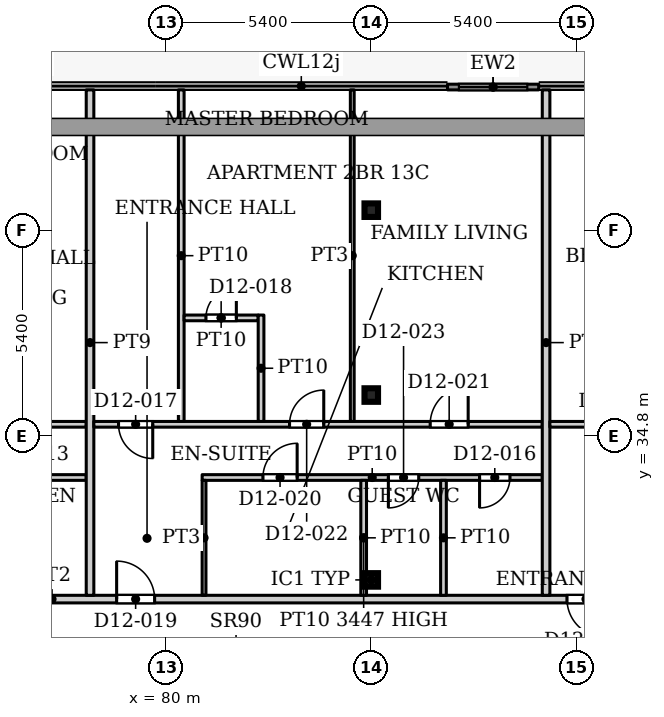
"""IFC4 building model, lengths in metres.
Left out: names, types, materials, properties, quantities, classifications, styles, units other than length and angle.
Written with IfcOpenShell. Run it as: python <this file> out.ifc"""

import sys

from ifc_helpers import new_model, si_unit, direction, frame, frame_2d, origin, origin_2d, place, context, subcontext, project, spatial, rectangle, hollow_rectangle, extrude, source, transform, mapped, element, fill, save


model = new_model("IFC4")
c1 = context("Model", 3, precision=1e-05, world=origin(), true_north=direction((0.0, 1.0)))
c2 = subcontext(c1, "Body", "Model", "MODEL_VIEW")
j1 = project(units=[si_unit("LENGTHUNIT", "METRE"), si_unit("PLANEANGLEUNIT", "RADIAN")], contexts=[c1])
p1 = place(None, origin())
s1 = spatial("IfcSite", under=j1, at=p1, CompositionType="ELEMENT")
p2 = place(p1, origin())
s2 = spatial("IfcBuilding", under=s1, at=p2, CompositionType="ELEMENT")
p3 = place(p2, frame((0.0, 0.0, 57.8)))
s3 = spatial("IfcBuildingStorey", under=s2, at=p3, CompositionType="ELEMENT", Elevation=57.8)
for number, where, z_axis, x_axis in (
    (1, (85.4, 31.005, 0.0), (0.0, 0.0, 1.0), (1.0, 0.0, 0.0)),
    (2, (85.4, 35.87, 0.0), (0.0, 0.0, 1.0), (1.0, 0.0, 0.0)),
    (3, (85.4, 40.735, 0.0), (0.0, 0.0, 1.0), (1.0, 0.0, 0.0)),
):
    element("IfcColumn", number, at=place(p3, frame(where, z_axis=z_axis, x_axis=x_axis)), inside=s3, PredefinedType="COLUMN", context=c2, shape_type="SweptSolid", body=[
        extrude(hollow_rectangle(XDim=0.356, YDim=0.356, WallThickness=0.016, InnerFilletRadius=0.016, OuterFilletRadius=0.032, at=origin_2d()), origin(), (0.0, 0.0, 1.0), 3.9),
    ])
p4 = place(p3, frame((87.406, 43.975, 0.0), z_axis=(0.0, 0.0, 1.0), x_axis=(1.0, 0.0, 0.0)))
e4 = element("IfcWall", 4, at=p4, inside=s3, PredefinedType="SOLIDWALL", context=c2, shape_type="SweptSolid", body=[
    extrude(rectangle(XDim=2.4, YDim=0.15, at=frame_2d((1.2, 0.0))), origin(), (0.0, 0.0, 1.0), 3.75),
])
p5 = place(p4, frame((0.3, 0.0, 0.0)))
e5 = element("IfcOpeningElement", 5, at=p5, cuts=e4, PredefinedType="OPENING", context=c2, shape_type="SweptSolid", body=[
    extrude(rectangle(XDim=1.8, YDim=2.4, at=frame_2d((0.9, 1.2))), frame((0.0, 0.085, 0.0), z_axis=(0.0, -1.0, 0.0), x_axis=(1.0, 0.0, 0.0)), (0.0, 0.0, 1.0), 0.17),
])
p6 = place(p3, frame((55.9, 30.5, 0.0), z_axis=(0.0, 0.0, 1.0), x_axis=(1.0, 0.0, 0.0)))
e6 = element("IfcWall", 6, at=p6, inside=s3, PredefinedType="PARTITIONING", context=c2, shape_type="SweptSolid", body=[
    extrude(rectangle(XDim=42.2, YDim=0.2, at=frame_2d((21.1, 0.0))), origin(), (0.0, 0.0, 1.0), 3.6),
])
p7 = place(p6, frame((0.6, 0.0, 0.0)))
e7 = element("IfcOpeningElement", 7, at=p7, cuts=e6, PredefinedType="OPENING", context=c2, shape_type="SweptSolid", body=[
    extrude(rectangle(XDim=1.0, YDim=2.1, at=frame_2d((0.5, 1.05))), frame((0.0, 0.11, 0.0), z_axis=(0.0, -1.0, 0.0), x_axis=(1.0, 0.0, 0.0)), (0.0, 0.0, 1.0), 0.22),
])
p8 = place(p6, frame((13.2, 0.0, 0.0)))
e8 = element("IfcOpeningElement", 8, at=p8, cuts=e6, PredefinedType="OPENING", context=c2, shape_type="SweptSolid", body=[
    extrude(rectangle(XDim=1.0, YDim=2.1, at=frame_2d((0.5, 1.05))), frame((0.0, 0.11, 0.0), z_axis=(0.0, -1.0, 0.0), x_axis=(1.0, 0.0, 0.0)), (0.0, 0.0, 1.0), 0.22),
])
p9 = place(p6, frame((22.8, 0.0, 0.0)))
e9 = element("IfcOpeningElement", 9, at=p9, cuts=e6, PredefinedType="OPENING", context=c2, shape_type="SweptSolid", body=[
    extrude(rectangle(XDim=1.0, YDim=2.1, at=frame_2d((0.5, 1.05))), frame((0.0, 0.11, 0.0), z_axis=(0.0, -1.0, 0.0), x_axis=(1.0, 0.0, 0.0)), (0.0, 0.0, 1.0), 0.22),
])
p10 = place(p6, frame((34.65, 0.0, 0.0)))
e10 = element("IfcOpeningElement", 10, at=p10, cuts=e6, PredefinedType="OPENING", context=c2, shape_type="SweptSolid", body=[
    extrude(rectangle(XDim=1.0, YDim=2.1, at=frame_2d((0.5, 1.05))), frame((0.0, 0.11, 0.0), z_axis=(0.0, -1.0, 0.0), x_axis=(1.0, 0.0, 0.0)), (0.0, 0.0, 1.0), 0.22),
])
p11 = place(p3, frame((68.8, 35.1, 0.0), z_axis=(0.0, 0.0, 1.0), x_axis=(1.0, 0.0, 0.0)))
e11 = element("IfcWall", 11, at=p11, inside=s3, PredefinedType="PARTITIONING", context=c2, shape_type="SweptSolid", body=[
    extrude(rectangle(XDim=9.1, YDim=0.15, at=frame_2d((4.55, 0.0))), origin(), (0.0, 0.0, 1.0), 3.6),
])
p12 = place(p11, frame((1.4, 0.0, 0.0)))
e12 = element("IfcOpeningElement", 12, at=p12, cuts=e11, PredefinedType="OPENING", context=c2, shape_type="SweptSolid", body=[
    extrude(rectangle(XDim=0.9, YDim=2.1, at=frame_2d((0.45, 1.05))), frame((0.0, 0.085, 0.0), z_axis=(0.0, -1.0, 0.0), x_axis=(1.0, 0.0, 0.0)), (0.0, 0.0, 1.0), 0.17),
])
p13 = place(p11, frame((6.0, 0.0, 0.0)))
e13 = element("IfcOpeningElement", 13, at=p13, cuts=e11, PredefinedType="OPENING", context=c2, shape_type="SweptSolid", body=[
    extrude(rectangle(XDim=1.0, YDim=2.1, at=frame_2d((0.5, 1.05))), frame((0.0, 0.085, 0.0), z_axis=(0.0, -1.0, 0.0), x_axis=(1.0, 0.0, 0.0)), (0.0, 0.0, 1.0), 0.17),
])
p14 = place(p3, frame((70.425, 33.7, 0.0), z_axis=(0.0, 0.0, 1.0), x_axis=(1.0, 0.0, 0.0)))
e14 = element("IfcWall", 14, at=p14, inside=s3, PredefinedType="PARTITIONING", context=c2, shape_type="SweptSolid", body=[
    extrude(rectangle(XDim=7.475, YDim=0.15, at=frame_2d((3.737, 0.0))), origin(), (0.0, 0.0, 1.0), 3.6),
])
p15 = place(p14, frame((0.875, 0.0, 0.0)))
e15 = element("IfcOpeningElement", 15, at=p15, cuts=e14, PredefinedType="OPENING", context=c2, shape_type="SweptSolid", body=[
    extrude(rectangle(XDim=0.8, YDim=2.1, at=frame_2d((0.4, 1.05))), frame((0.0, 0.085, 0.0), z_axis=(0.0, -1.0, 0.0), x_axis=(1.0, 0.0, 0.0)), (0.0, 0.0, 1.0), 0.17),
])
p16 = place(p14, frame((5.475, 0.0, 0.0)))
e16 = element("IfcOpeningElement", 16, at=p16, cuts=e14, PredefinedType="OPENING", context=c2, shape_type="SweptSolid", body=[
    extrude(rectangle(XDim=0.9, YDim=2.1, at=frame_2d((0.45, 1.05))), frame((0.0, 0.085, 0.0), z_axis=(0.0, -1.0, 0.0), x_axis=(1.0, 0.0, 0.0)), (0.0, 0.0, 1.0), 0.17),
])
p17 = place(p14, frame((2.975, 0.0, 0.0)))
e17 = element("IfcOpeningElement", 17, at=p17, cuts=e14, PredefinedType="OPENING", context=c2, shape_type="SweptSolid", body=[
    extrude(rectangle(XDim=0.8, YDim=2.1, at=frame_2d((0.4, 1.05))), frame((0.0, 0.085, 0.0), z_axis=(0.0, -1.0, 0.0), x_axis=(1.0, 0.0, 0.0)), (0.0, 0.0, 1.0), 0.17),
])
p18 = place(p3, frame((78.0, 30.6, 0.0), z_axis=(0.0, 0.0, 1.0), x_axis=(0.0, 1.0, 0.0)))
e18 = element("IfcWall", 18, at=p18, inside=s3, PredefinedType="PARTITIONING", context=c2, shape_type="SweptSolid", body=[
    extrude(rectangle(XDim=13.3, YDim=0.2, at=frame_2d((6.65, 0.0))), origin(), (0.0, 0.0, 1.0), 3.6),
])
p19 = place(p3, frame((78.1, 35.1, 0.0), z_axis=(0.0, 0.0, 1.0), x_axis=(1.0, 0.0, 0.0)))
e19 = element("IfcWall", 19, at=p19, inside=s3, PredefinedType="PARTITIONING", context=c2, shape_type="SweptSolid", body=[
    extrude(rectangle(XDim=11.8, YDim=0.15, at=frame_2d((5.9, 0.0))), origin(), (0.0, 0.0, 1.0), 3.6),
])
p20 = place(p19, frame((0.65, 0.0, 0.0)))
e20 = element("IfcOpeningElement", 20, at=p20, cuts=e19, PredefinedType="OPENING", context=c2, shape_type="SweptSolid", body=[
    extrude(rectangle(XDim=0.9, YDim=2.1, at=frame_2d((0.45, 1.05))), frame((0.0, 0.085, 0.0), z_axis=(0.0, -1.0, 0.0), x_axis=(1.0, 0.0, 0.0)), (0.0, 0.0, 1.0), 0.17),
])
p21 = place(p19, frame((8.85, 0.0, 0.0)))
e21 = element("IfcOpeningElement", 21, at=p21, cuts=e19, PredefinedType="OPENING", context=c2, shape_type="SweptSolid", body=[
    extrude(rectangle(XDim=1.0, YDim=2.1, at=frame_2d((0.5, 1.05))), frame((0.0, 0.085, 0.0), z_axis=(0.0, -1.0, 0.0), x_axis=(1.0, 0.0, 0.0)), (0.0, 0.0, 1.0), 0.17),
])
p22 = place(p19, frame((5.15, 0.0, 0.0)))
e22 = element("IfcOpeningElement", 22, at=p22, cuts=e19, PredefinedType="OPENING", context=c2, shape_type="SweptSolid", body=[
    extrude(rectangle(XDim=0.9, YDim=2.1, at=frame_2d((0.45, 1.05))), frame((0.0, 0.085, 0.0), z_axis=(0.0, -1.0, 0.0), x_axis=(1.0, 0.0, 0.0)), (0.0, 0.0, 1.0), 0.17),
])
p23 = place(p3, frame((80.4, 35.175, 0.0), z_axis=(0.0, 0.0, 1.0), x_axis=(0.0, 1.0, 0.0)))
e23 = element("IfcWall", 23, at=p23, inside=s3, PredefinedType="PARTITIONING", context=c2, shape_type="SweptSolid", body=[
    extrude(rectangle(XDim=8.725, YDim=0.15, at=frame_2d((4.362, 0.0))), origin(), (0.0, 0.0, 1.0), 3.6),
])
p24 = place(p3, frame((80.475, 37.9, 0.0), z_axis=(0.0, 0.0, 1.0), x_axis=(1.0, 0.0, 0.0)))
e24 = element("IfcWall", 24, at=p24, inside=s3, PredefinedType="PARTITIONING", context=c2, shape_type="SweptSolid", body=[
    extrude(rectangle(XDim=1.95, YDim=0.15, at=frame_2d((0.975, 0.0))), origin(), (0.0, 0.0, 1.0), 3.6),
])
p25 = place(p24, frame((0.575, 0.0, 0.0)))
e25 = element("IfcOpeningElement", 25, at=p25, cuts=e24, PredefinedType="OPENING", context=c2, shape_type="SweptSolid", body=[
    extrude(rectangle(XDim=0.8, YDim=2.1, at=frame_2d((0.4, 1.05))), frame((0.0, 0.085, 0.0), z_axis=(0.0, -1.0, 0.0), x_axis=(1.0, 0.0, 0.0)), (0.0, 0.0, 1.0), 0.17),
])
p26 = place(p3, frame((80.95, 33.7, 0.0), z_axis=(0.0, 0.0, 1.0), x_axis=(1.0, 0.0, 0.0)))
e26 = element("IfcWall", 26, at=p26, inside=s3, PredefinedType="PARTITIONING", context=c2, shape_type="SweptSolid", body=[
    extrude(rectangle(XDim=8.95, YDim=0.15, at=frame_2d((4.475, 0.0))), origin(), (0.0, 0.0, 1.0), 3.6),
])
p27 = place(p26, frame((7.3, 0.0, 0.0)))
e27 = element("IfcOpeningElement", 27, at=p27, cuts=e26, PredefinedType="OPENING", context=c2, shape_type="SweptSolid", body=[
    extrude(rectangle(XDim=0.8, YDim=2.1, at=frame_2d((0.4, 1.05))), frame((0.0, 0.085, 0.0), z_axis=(0.0, -1.0, 0.0), x_axis=(1.0, 0.0, 0.0)), (0.0, 0.0, 1.0), 0.17),
])
p28 = place(p26, frame((1.6, 0.0, 0.0)))
e28 = element("IfcOpeningElement", 28, at=p28, cuts=e26, PredefinedType="OPENING", context=c2, shape_type="SweptSolid", body=[
    extrude(rectangle(XDim=0.9, YDim=2.1, at=frame_2d((0.45, 1.05))), frame((0.0, 0.085, 0.0), z_axis=(0.0, -1.0, 0.0), x_axis=(1.0, 0.0, 0.0)), (0.0, 0.0, 1.0), 0.17),
])
p29 = place(p26, frame((4.9, 0.0, 0.0)))
e29 = element("IfcOpeningElement", 29, at=p29, cuts=e26, PredefinedType="OPENING", context=c2, shape_type="SweptSolid", body=[
    extrude(rectangle(XDim=0.8, YDim=2.1, at=frame_2d((0.4, 1.05))), frame((0.0, 0.085, 0.0), z_axis=(0.0, -1.0, 0.0), x_axis=(1.0, 0.0, 0.0)), (0.0, 0.0, 1.0), 0.17),
])
p30 = place(p3, frame((81.0, 30.6, 0.0), z_axis=(0.0, 0.0, 1.0), x_axis=(0.0, 1.0, 0.0)))
e30 = element("IfcWall", 30, at=p30, inside=s3, PredefinedType="PARTITIONING", context=c2, shape_type="SweptSolid", body=[
    extrude(rectangle(XDim=3.025, YDim=0.1, at=frame_2d((1.512, 0.0))), origin(), (0.0, 0.0, 1.0), 3.6),
])
p31 = place(p3, frame((82.5, 35.175, 0.0), z_axis=(0.0, 0.0, 1.0), x_axis=(0.0, 1.0, 0.0)))
e31 = element("IfcWall", 31, at=p31, inside=s3, PredefinedType="PARTITIONING", context=c2, shape_type="SweptSolid", body=[
    extrude(rectangle(XDim=2.8, YDim=0.15, at=frame_2d((1.4, 0.0))), origin(), (0.0, 0.0, 1.0), 3.6),
])
p32 = place(p3, frame((84.9, 35.175, 0.0), z_axis=(0.0, 0.0, 1.0), x_axis=(0.0, 1.0, 0.0)))
e32 = element("IfcWall", 32, at=p32, inside=s3, PredefinedType="PARTITIONING", context=c2, shape_type="SweptSolid", body=[
    extrude(rectangle(XDim=8.725, YDim=0.1, at=frame_2d((4.362, 0.0))), origin(), (0.0, 0.0, 1.0), 3.6),
])
p33 = place(p3, frame((85.2, 30.6, 0.0), z_axis=(0.0, 0.0, 1.0), x_axis=(0.0, 1.0, 0.0)))
e33 = element("IfcWall", 33, at=p33, inside=s3, PredefinedType="PARTITIONING", context=c2, shape_type="SweptSolid", body=[
    extrude(rectangle(XDim=3.025, YDim=0.15, at=frame_2d((1.512, 0.0))), origin(), (0.0, 0.0, 1.0), 3.447),
])
p34 = place(p3, frame((87.3, 30.6, 0.0), z_axis=(0.0, 0.0, 1.0), x_axis=(0.0, 1.0, 0.0)))
e34 = element("IfcWall", 34, at=p34, inside=s3, PredefinedType="PARTITIONING", context=c2, shape_type="SweptSolid", body=[
    extrude(rectangle(XDim=3.025, YDim=0.15, at=frame_2d((1.512, 0.0))), origin(), (0.0, 0.0, 1.0), 3.6),
])
p35 = place(p3, frame((90.0, 30.6, 0.0), z_axis=(0.0, 0.0, 1.0), x_axis=(0.0, 1.0, 0.0)))
e35 = element("IfcWall", 35, at=p35, inside=s3, PredefinedType="PARTITIONING", context=c2, shape_type="SweptSolid", body=[
    extrude(rectangle(XDim=13.3, YDim=0.2, at=frame_2d((6.65, 0.0))), origin(), (0.0, 0.0, 1.0), 3.6),
])
p36 = place(p3, frame((90.1, 35.1, 0.0), z_axis=(0.0, 0.0, 1.0), x_axis=(1.0, 0.0, 0.0)))
e36 = element("IfcWall", 36, at=p36, inside=s3, PredefinedType="PARTITIONING", context=c2, shape_type="SweptSolid", body=[
    extrude(rectangle(XDim=9.8, YDim=0.15, at=frame_2d((4.9, 0.0))), origin(), (0.0, 0.0, 1.0), 3.6),
])
p37 = place(p36, frame((1.4, 0.0, 0.0)))
e37 = element("IfcOpeningElement", 37, at=p37, cuts=e36, PredefinedType="OPENING", context=c2, shape_type="SweptSolid", body=[
    extrude(rectangle(XDim=0.9, YDim=2.1, at=frame_2d((0.45, 1.05))), frame((0.0, 0.085, 0.0), z_axis=(0.0, -1.0, 0.0), x_axis=(1.0, 0.0, 0.0)), (0.0, 0.0, 1.0), 0.17),
])
p38 = place(p36, frame((6.3, 0.0, 0.0)))
e38 = element("IfcOpeningElement", 38, at=p38, cuts=e36, PredefinedType="OPENING", context=c2, shape_type="SweptSolid", body=[
    extrude(rectangle(XDim=1.0, YDim=2.1, at=frame_2d((0.5, 1.05))), frame((0.0, 0.085, 0.0), z_axis=(0.0, -1.0, 0.0), x_axis=(1.0, 0.0, 0.0)), (0.0, 0.0, 1.0), 0.17),
])
m1 = source(origin(), c2, "Body", "SweptSolid", [
    extrude(rectangle(XDim=1.8, YDim=2.4, at=frame_2d((0.9, 1.2))), frame((0.0, 0.025, 0.0), z_axis=(0.0, -1.0, 0.0), x_axis=(1.0, 0.0, 0.0)), (0.0, 0.0, 1.0), 0.05),
])
p39 = place(p5, origin())
e39 = element("IfcDoor", 39, at=p39, inside=s3, OperationType="SLIDING_TO_LEFT", PredefinedType="DOOR", context=c2, shape_type="MappedRepresentation", body=[
    mapped(m1, transform((0.0, 0.0, 0.0), x_axis=(1.0, 0.0, 0.0), y_axis=(0.0, 1.0, 0.0), z_axis=(0.0, 0.0, 1.0), scale=1.0)),
])
fill(e5, e39)
m2 = source(origin(), c2, "Body", "SweptSolid", [
    extrude(rectangle(XDim=0.8, YDim=2.1, at=frame_2d((0.4, 1.05))), frame((0.0, 0.025, 0.0), z_axis=(0.0, -1.0, 0.0), x_axis=(1.0, 0.0, 0.0)), (0.0, 0.0, 1.0), 0.05),
])
p40 = place(p27, origin())
e40 = element("IfcDoor", 40, at=p40, inside=s3, OperationType="SINGLE_SWING_RIGHT", PredefinedType="DOOR", context=c2, shape_type="MappedRepresentation", body=[
    mapped(m2, transform((0.0, 0.0, 0.0), x_axis=(1.0, 0.0, 0.0), y_axis=(0.0, 1.0, 0.0), z_axis=(0.0, 0.0, 1.0), scale=1.0)),
])
fill(e27, e40)
m3 = source(origin(), c2, "Body", "SweptSolid", [
    extrude(rectangle(XDim=0.9, YDim=2.1, at=frame_2d((0.45, 1.05))), frame((0.0, 0.025, 0.0), z_axis=(0.0, -1.0, 0.0), x_axis=(1.0, 0.0, 0.0)), (0.0, 0.0, 1.0), 0.05),
])
p41 = place(p20, origin())
e41 = element("IfcDoor", 41, at=p41, inside=s3, OperationType="SINGLE_SWING_RIGHT", PredefinedType="DOOR", context=c2, shape_type="MappedRepresentation", body=[
    mapped(m3, transform((0.0, 0.0, 0.0), x_axis=(1.0, 0.0, 0.0), y_axis=(0.0, 1.0, 0.0), z_axis=(0.0, 0.0, 1.0), scale=1.0)),
])
fill(e20, e41)
p42 = place(p25, origin())
e42 = element("IfcDoor", 42, at=p42, inside=s3, OperationType="SINGLE_SWING_LEFT", PredefinedType="DOOR", context=c2, shape_type="MappedRepresentation", body=[
    mapped(m2, transform((0.0, 0.0, 0.0), x_axis=(1.0, 0.0, 0.0), y_axis=(0.0, 1.0, 0.0), z_axis=(0.0, 0.0, 1.0), scale=1.0)),
])
fill(e25, e42)
m4 = source(origin(), c2, "Body", "SweptSolid", [
    extrude(rectangle(XDim=1.0, YDim=2.1, at=frame_2d((0.5, 1.05))), frame((0.0, 0.025, 0.0), z_axis=(0.0, -1.0, 0.0), x_axis=(1.0, 0.0, 0.0)), (0.0, 0.0, 1.0), 0.05),
])
p43 = place(p9, origin())
e43 = element("IfcDoor", 43, at=p43, inside=s3, OperationType="SINGLE_SWING_LEFT", PredefinedType="DOOR", context=c2, shape_type="MappedRepresentation", body=[
    mapped(m4, transform((0.0, 0.0, 0.0), x_axis=(1.0, 0.0, 0.0), y_axis=(0.0, 1.0, 0.0), z_axis=(0.0, 0.0, 1.0), scale=1.0)),
])
fill(e9, e43)
p44 = place(p28, origin())
e44 = element("IfcDoor", 44, at=p44, inside=s3, OperationType="SINGLE_SWING_LEFT", PredefinedType="DOOR", context=c2, shape_type="MappedRepresentation", body=[
    mapped(m3, transform((0.0, 0.0, 0.0), x_axis=(1.0, 0.0, 0.0), y_axis=(0.0, 1.0, 0.0), z_axis=(0.0, 0.0, 1.0), scale=1.0)),
])
fill(e28, e44)
m5 = source(origin(), c2, "Body", "SweptSolid", [
    extrude(rectangle(XDim=1.0, YDim=2.1, at=frame_2d((0.5, 1.05))), frame((0.0, 0.025, 0.0), z_axis=(0.0, -1.0, 0.0), x_axis=(1.0, 0.0, 0.0)), (0.0, 0.0, 1.0), 0.05),
])
p45 = place(p21, origin())
e45 = element("IfcDoor", 45, at=p45, inside=s3, OperationType="SINGLE_SWING_LEFT", PredefinedType="DOOR", context=c2, shape_type="MappedRepresentation", body=[
    mapped(m5, transform((0.0, 0.0, 0.0), x_axis=(1.0, 0.0, 0.0), y_axis=(0.0, 1.0, 0.0), z_axis=(0.0, 0.0, 1.0), scale=1.0)),
])
fill(e21, e45)
p46 = place(p22, origin())
e46 = element("IfcDoor", 46, at=p46, inside=s3, OperationType="SINGLE_SWING_LEFT", PredefinedType="DOOR", context=c2, shape_type="MappedRepresentation", body=[
    mapped(m3, transform((0.0, 0.0, 0.0), x_axis=(1.0, 0.0, 0.0), y_axis=(0.0, 1.0, 0.0), z_axis=(0.0, 0.0, 1.0), scale=1.0)),
])
fill(e22, e46)
p47 = place(p29, origin())
e47 = element("IfcDoor", 47, at=p47, inside=s3, OperationType="SINGLE_SWING_RIGHT", PredefinedType="DOOR", context=c2, shape_type="MappedRepresentation", body=[
    mapped(m2, transform((0.0, 0.0, 0.0), x_axis=(1.0, 0.0, 0.0), y_axis=(0.0, 1.0, 0.0), z_axis=(0.0, 0.0, 1.0), scale=1.0)),
])
fill(e29, e47)
p48 = place(p10, origin())
e48 = element("IfcDoor", 48, at=p48, inside=s3, OperationType="SINGLE_SWING_RIGHT", PredefinedType="DOOR", context=c2, shape_type="MappedRepresentation", body=[
    mapped(m4, transform((0.0, 0.0, 0.0), x_axis=(1.0, 0.0, 0.0), y_axis=(0.0, 1.0, 0.0), z_axis=(0.0, 0.0, 1.0), scale=1.0)),
])
fill(e10, e48)
save(model, sys.argv[1])
